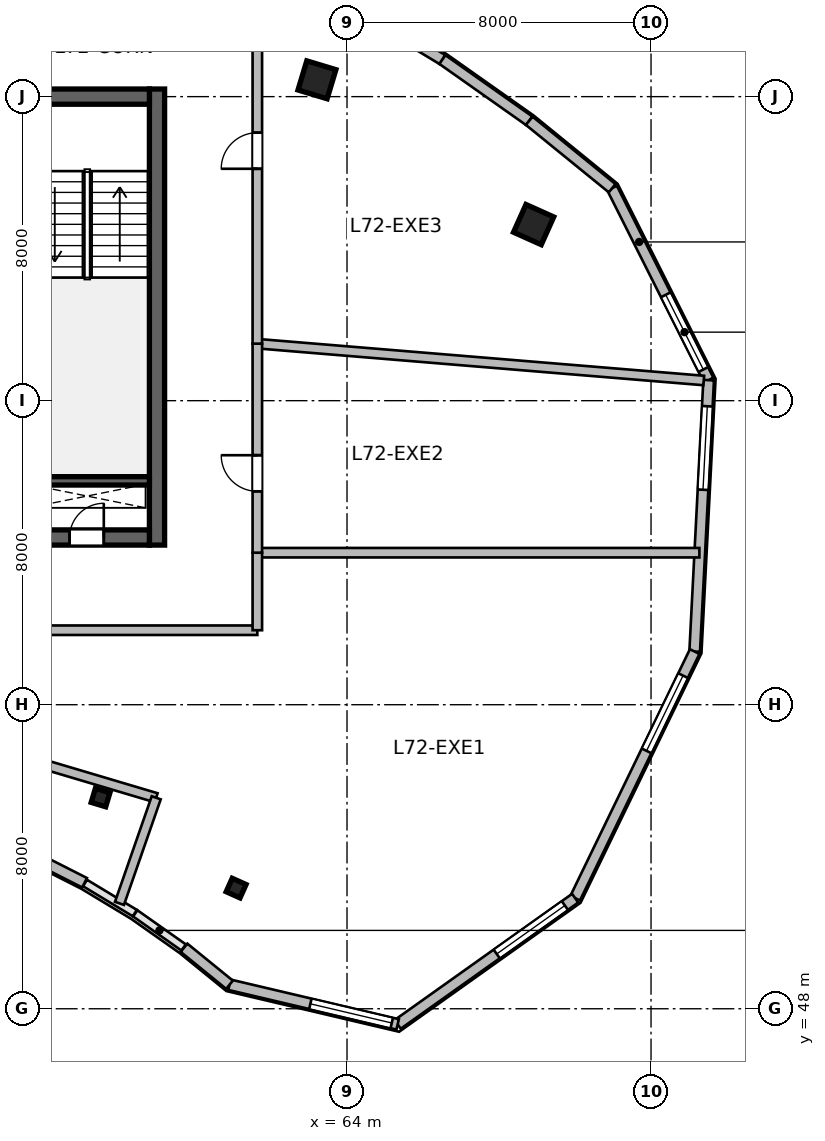
"""IFC4 building model, lengths in metres.
Left out: names, types, materials, properties, quantities, classifications, styles, units other than length and angle.
Written with IfcOpenShell. Run it as: python <this file> out.ifc"""

import sys

from ifc_helpers import new_model, si_unit, direction, frame, frame_2d, origin, origin_2d, place, context, subcontext, project, spatial, rectangle, i_section, extrude, source, transform, mapped, element, fill, save


model = new_model("IFC4")
c1 = context("Model", 3, precision=1e-05, world=origin(), true_north=direction((0.0, 1.0)))
c2 = subcontext(c1, "Body", "Model", "MODEL_VIEW")
j1 = project(units=[si_unit("LENGTHUNIT", "METRE"), si_unit("PLANEANGLEUNIT", "RADIAN")], contexts=[c1])
p1 = place(None, origin())
s1 = spatial("IfcSite", under=j1, at=p1, CompositionType="ELEMENT")
p2 = place(p1, origin())
s2 = spatial("IfcBuilding", under=s1, at=p2, CompositionType="ELEMENT")
p3 = place(p2, frame((0.0, 0.0, 295.2)))
s3 = spatial("IfcBuildingStorey", under=s2, at=p3, CompositionType="ELEMENT", Elevation=295.2)
m1 = source(origin(), c2, "Body", "SweptSolid", [
    extrude(rectangle(XDim=12.0, YDim=0.4, at=frame_2d((6.0, 0.0))), origin(), (0.0, 0.0, 1.0), 3.9),
])
p4 = place(p3, frame((59.0, 60.2, 0.0), z_axis=(0.0, 0.0, 1.0), x_axis=(0.0, 1.0, 0.0)))
e1 = element("IfcWall", 1, at=p4, inside=s3, PredefinedType="SHEAR", context=c2, shape_type="MappedRepresentation", body=[
    mapped(m1, transform((0.0, 0.0, 0.0), scale=1.0)),
])
m2 = source(origin(), c2, "Body", "SweptSolid", [
    extrude(rectangle(XDim=21.6, YDim=0.4, at=frame_2d((10.8, 0.0))), origin(), (0.0, 0.0, 1.0), 3.9),
])
p5 = place(p3, frame((37.2, 60.4, 0.0), z_axis=(0.0, 0.0, 1.0), x_axis=(1.0, 0.0, 0.0)))
e2 = element("IfcWall", 2, at=p5, inside=s3, PredefinedType="SHEAR", context=c2, shape_type="MappedRepresentation", body=[
    mapped(m2, transform((0.0, 0.0, 0.0), scale=1.0)),
])
p6 = place(p5, frame((1.1, 0.0, 0.0)))
e3 = element("IfcOpeningElement", 3, at=p6, cuts=e2, PredefinedType="OPENING", context=c2, shape_type="SweptSolid", body=[
    extrude(rectangle(XDim=1.15, YDim=2.15, at=frame_2d((0.575, 1.075))), frame((0.0, 0.21, 0.0), z_axis=(0.0, -1.0, 0.0), x_axis=(1.0, 0.0, 0.0)), (0.0, 0.0, 1.0), 0.42),
])
p7 = place(p5, frame((19.5, 0.0, 0.0)))
e4 = element("IfcOpeningElement", 4, at=p7, cuts=e2, PredefinedType="OPENING", context=c2, shape_type="SweptSolid", body=[
    extrude(rectangle(XDim=0.9, YDim=2.1, at=frame_2d((0.45, 1.05))), frame((0.0, 0.21, 0.0), z_axis=(0.0, -1.0, 0.0), x_axis=(1.0, 0.0, 0.0)), (0.0, 0.0, 1.0), 0.42),
])
p8 = place(p5, frame((12.02, 0.0, 0.0)))
e5 = element("IfcOpeningElement", 5, at=p8, cuts=e2, PredefinedType="OPENING", context=c2, shape_type="SweptSolid", body=[
    extrude(rectangle(XDim=1.6, YDim=2.15, at=frame_2d((0.8, 1.075))), frame((0.0, 0.21, 0.0), z_axis=(0.0, -1.0, 0.0), x_axis=(1.0, 0.0, 0.0)), (0.0, 0.0, 1.0), 0.42),
])
p9 = place(p3, frame((37.2, 72.0, 0.0), z_axis=(0.0, 0.0, 1.0), x_axis=(1.0, 0.0, 0.0)))
e6 = element("IfcWall", 6, at=p9, inside=s3, PredefinedType="SHEAR", context=c2, shape_type="MappedRepresentation", body=[
    mapped(m2, transform((0.0, 0.0, 0.0), scale=1.0)),
])
p10 = place(p9, frame((1.2, 0.0, 0.0)))
e7 = element("IfcOpeningElement", 7, at=p10, cuts=e6, PredefinedType="OPENING", context=c2, shape_type="SweptSolid", body=[
    extrude(rectangle(XDim=0.9, YDim=2.1, at=frame_2d((0.45, 1.05))), frame((0.0, 0.21, 0.0), z_axis=(0.0, -1.0, 0.0), x_axis=(1.0, 0.0, 0.0)), (0.0, 0.0, 1.0), 0.42),
])
p11 = place(p9, frame((14.7, 0.0, 0.0)))
e8 = element("IfcOpeningElement", 8, at=p11, cuts=e6, PredefinedType="OPENING", context=c2, shape_type="SweptSolid", body=[
    extrude(rectangle(XDim=1.2, YDim=2.15, at=frame_2d((0.6, 1.075))), frame((0.0, 0.21, 0.0), z_axis=(0.0, -1.0, 0.0), x_axis=(1.0, 0.0, 0.0)), (0.0, 0.0, 1.0), 0.42),
])
p12 = place(p9, frame((4.15, 0.0, 0.0)))
e9 = element("IfcOpeningElement", 9, at=p12, cuts=e6, PredefinedType="OPENING", context=c2, shape_type="SweptSolid", body=[
    extrude(rectangle(XDim=1.3, YDim=2.15, at=frame_2d((0.65, 1.075))), frame((0.0, 0.21, 0.0), z_axis=(0.0, -1.0, 0.0), x_axis=(1.0, 0.0, 0.0)), (0.0, 0.0, 1.0), 0.42),
])
p13 = place(p9, frame((7.25, 0.0, 0.0)))
e10 = element("IfcOpeningElement", 10, at=p13, cuts=e6, PredefinedType="OPENING", context=c2, shape_type="SweptSolid", body=[
    extrude(rectangle(XDim=0.9, YDim=2.1, at=frame_2d((0.45, 1.05))), frame((0.0, 0.21, 0.0), z_axis=(0.0, -1.0, 0.0), x_axis=(1.0, 0.0, 0.0)), (0.0, 0.0, 1.0), 0.42),
])
p14 = place(p9, frame((10.95, 0.0, 0.0)))
e11 = element("IfcOpeningElement", 11, at=p14, cuts=e6, PredefinedType="OPENING", context=c2, shape_type="SweptSolid", body=[
    extrude(rectangle(XDim=0.9, YDim=2.1, at=frame_2d((0.45, 1.05))), frame((0.0, 0.21, 0.0), z_axis=(0.0, -1.0, 0.0), x_axis=(1.0, 0.0, 0.0)), (0.0, 0.0, 1.0), 0.42),
])
m3 = source(origin(), c2, "Body", "SweptSolid", [
    extrude(rectangle(XDim=3.27, YDim=0.22, at=frame_2d((1.635, 0.0))), origin(), (0.0, 0.0, 1.0), 3.9),
])
p15 = place(p3, frame((55.53, 61.89, 0.0), z_axis=(0.0, 0.0, 1.0), x_axis=(1.0, 0.0, 0.0)))
e12 = element("IfcWall", 12, at=p15, inside=s3, PredefinedType="SHEAR", context=c2, shape_type="MappedRepresentation", body=[
    mapped(m3, transform((0.0, 0.0, 0.0), scale=1.0)),
])
m4 = source(origin(), c2, "Body", "SweptSolid", [
    extrude(i_section(OverallWidth=0.399, OverallDepth=0.387, WebThickness=0.021, FlangeThickness=0.033, at=origin_2d()), origin(), (0.0, 0.0, 1.0), 3.9),
])
p16 = place(p3, frame((57.515, 53.558, 0.0), z_axis=(0.0, 0.0, 1.0), x_axis=(0.288697611798, 0.957420330337, 0.0)))
e13 = element("IfcColumn", 13, at=p16, inside=s3, PredefinedType="COLUMN", context=c2, shape_type="MappedRepresentation", body=[
    mapped(m4, transform((0.0, 0.0, 0.0), scale=1.0)),
])
m5 = source(origin(), c2, "Body", "SweptSolid", [
    extrude(rectangle(XDim=0.8, YDim=0.8, at=origin_2d()), origin(), (0.0, 0.0, 1.0), 3.9),
])
p17 = place(p3, frame((63.209, 72.442, 0.0), z_axis=(0.0, 0.0, 1.0), x_axis=(0.288697611798, 0.957420330337, 0.0)))
e14 = element("IfcColumn", 14, at=p17, inside=s3, PredefinedType="COLUMN", context=c2, shape_type="MappedRepresentation", body=[
    mapped(m5, transform((0.0, 0.0, 0.0), scale=1.0)),
])
p18 = place(p3, frame((61.082, 51.175, 0.0), z_axis=(0.0, 0.0, 1.0), x_axis=(0.409126902895, 0.912477494148, 0.0)))
e15 = element("IfcColumn", 15, at=p18, inside=s3, PredefinedType="COLUMN", context=c2, shape_type="MappedRepresentation", body=[
    mapped(m4, transform((0.0, 0.0, 0.0), scale=1.0)),
])
p19 = place(p3, frame((68.91, 68.633, 0.0), z_axis=(0.0, 0.0, 1.0), x_axis=(0.409126902895, 0.912477494148, 0.0)))
e16 = element("IfcColumn", 16, at=p19, inside=s3, PredefinedType="COLUMN", context=c2, shape_type="MappedRepresentation", body=[
    mapped(m5, transform((0.0, 0.0, 0.0), scale=1.0)),
])
m6 = source(origin(), c2, "Body", "SweptSolid", [
    extrude(rectangle(XDim=5.653, YDim=0.28, at=frame_2d((2.827, 0.0))), origin(), (0.0, 0.0, 1.0), 3.64),
])
p20 = place(p3, frame((70.976, 69.591, 0.0), z_axis=(0.0, 0.0, 1.0), x_axis=(0.449302555419, -0.893379658205, 0.0)))
e17 = element("IfcWall", 17, at=p20, inside=s3, PredefinedType="SOLIDWALL", context=c2, shape_type="MappedRepresentation", body=[
    mapped(m6, transform((0.0, 0.0, 0.0), scale=1.0)),
])
p21 = place(p20, frame((3.14, 0.0, 0.95)))
e18 = element("IfcOpeningElement", 18, at=p21, cuts=e17, PredefinedType="OPENING", context=c2, shape_type="SweptSolid", body=[
    extrude(rectangle(XDim=2.2, YDim=2.1, at=frame_2d((1.1, 1.05))), frame((0.0, 0.15, 0.0), z_axis=(0.0, -1.0, 0.0), x_axis=(1.0, 0.0, 0.0)), (0.0, 0.0, 1.0), 0.3),
])
m7 = source(origin(), c2, "Body", "SweptSolid", [
    extrude(rectangle(XDim=7.151, YDim=0.28, at=frame_2d((3.576, 0.0))), origin(), (0.0, 0.0, 1.0), 3.64),
])
p22 = place(p3, frame((73.516, 64.54, 0.0), z_axis=(0.0, 0.0, 1.0), x_axis=(-0.051449614265, -0.998675591567, 0.0)))
e19 = element("IfcWall", 19, at=p22, inside=s3, PredefinedType="SOLIDWALL", context=c2, shape_type="MappedRepresentation", body=[
    mapped(m7, transform((0.0, 0.0, 0.0), scale=1.0)),
])
p23 = place(p22, frame((0.688, 0.0, 0.95)))
e20 = element("IfcOpeningElement", 20, at=p23, cuts=e19, PredefinedType="OPENING", context=c2, shape_type="SweptSolid", body=[
    extrude(rectangle(XDim=2.2, YDim=2.1, at=frame_2d((1.1, 1.05))), frame((0.0, 0.15, 0.0), z_axis=(0.0, -1.0, 0.0), x_axis=(1.0, 0.0, 0.0)), (0.0, 0.0, 1.0), 0.3),
])
m8 = source(origin(), c2, "Body", "SweptSolid", [
    extrude(rectangle(XDim=7.211, YDim=0.28, at=frame_2d((3.606, 0.0))), origin(), (0.0, 0.0, 1.0), 3.64),
])
p24 = place(p3, frame((73.148, 57.399, 0.0), z_axis=(0.0, 0.0, 1.0), x_axis=(-0.436088263006, -0.899903898685, 0.0)))
e21 = element("IfcWall", 21, at=p24, inside=s3, PredefinedType="SOLIDWALL", context=c2, shape_type="MappedRepresentation", body=[
    mapped(m8, transform((0.0, 0.0, 0.0), scale=1.0)),
])
p25 = place(p24, frame((0.703, 0.0, 0.95)))
e22 = element("IfcOpeningElement", 22, at=p25, cuts=e21, PredefinedType="OPENING", context=c2, shape_type="SweptSolid", body=[
    extrude(rectangle(XDim=2.2, YDim=2.1, at=frame_2d((1.1, 1.05))), frame((0.0, 0.15, 0.0), z_axis=(0.0, -1.0, 0.0), x_axis=(1.0, 0.0, 0.0)), (0.0, 0.0, 1.0), 0.3),
])
m9 = source(origin(), c2, "Body", "SweptSolid", [
    extrude(rectangle(XDim=5.731, YDim=0.28, at=frame_2d((2.865, 0.0))), origin(), (0.0, 0.0, 1.0), 3.64),
])
p26 = place(p3, frame((70.004, 50.909, 0.0), z_axis=(0.0, 0.0, 1.0), x_axis=(-0.815021045908, -0.579431354629, 0.0)))
e23 = element("IfcWall", 23, at=p26, inside=s3, PredefinedType="SOLIDWALL", context=c2, shape_type="MappedRepresentation", body=[
    mapped(m9, transform((0.0, 0.0, 0.0), scale=1.0)),
])
p27 = place(p26, frame((0.333, 0.0, 0.95)))
e24 = element("IfcOpeningElement", 24, at=p27, cuts=e23, PredefinedType="OPENING", context=c2, shape_type="SweptSolid", body=[
    extrude(rectangle(XDim=2.2, YDim=2.1, at=frame_2d((1.1, 1.05))), frame((0.0, 0.15, 0.0), z_axis=(0.0, -1.0, 0.0), x_axis=(1.0, 0.0, 0.0)), (0.0, 0.0, 1.0), 0.3),
])
m10 = source(origin(), c2, "Body", "SweptSolid", [
    extrude(rectangle(XDim=4.547, YDim=0.28, at=frame_2d((2.273, 0.0))), origin(), (0.0, 0.0, 1.0), 3.64),
])
p28 = place(p3, frame((65.333, 47.589, 0.0), z_axis=(0.0, 0.0, 1.0), x_axis=(-0.973332593516, 0.229398479505, 0.0)))
e25 = element("IfcWall", 25, at=p28, inside=s3, PredefinedType="SOLIDWALL", context=c2, shape_type="MappedRepresentation", body=[
    mapped(m10, transform((0.0, 0.0, 0.0), scale=1.0)),
])
p29 = place(p28, frame((0.16, 0.0, 0.95)))
e26 = element("IfcOpeningElement", 26, at=p29, cuts=e25, PredefinedType="OPENING", context=c2, shape_type="SweptSolid", body=[
    extrude(rectangle(XDim=2.2, YDim=2.1, at=frame_2d((1.1, 1.05))), frame((0.0, 0.15, 0.0), z_axis=(0.0, -1.0, 0.0), x_axis=(1.0, 0.0, 0.0)), (0.0, 0.0, 1.0), 0.3),
])
m11 = source(origin(), c2, "Body", "SweptSolid", [
    extrude(rectangle(XDim=1.543, YDim=0.28, at=frame_2d((0.772, 0.0))), origin(), (0.0, 0.0, 1.0), 3.64),
])
p30 = place(p3, frame((60.908, 48.632, 0.0), z_axis=(0.0, 0.0, 1.0), x_axis=(-0.77582846857, 0.63094388606, 0.0)))
e27 = element("IfcWall", 27, at=p30, inside=s3, PredefinedType="SOLIDWALL", context=c2, shape_type="MappedRepresentation", body=[
    mapped(m11, transform((0.0, 0.0, 0.0), scale=1.0)),
])
m12 = source(origin(), c2, "Body", "SweptSolid", [
    extrude(rectangle(XDim=1.509, YDim=0.28, at=frame_2d((0.754, 0.0))), origin(), (0.0, 0.0, 1.0), 3.64),
])
p31 = place(p3, frame((57.094, 51.315, 0.0), z_axis=(0.0, 0.0, 1.0), x_axis=(-0.89169189228, 0.452642871635, 0.0)))
e28 = element("IfcWall", 28, at=p31, inside=s3, PredefinedType="SOLIDWALL", context=c2, shape_type="MappedRepresentation", body=[
    mapped(m12, transform((0.0, 0.0, 0.0), scale=1.0)),
])
m13 = source(origin(), c2, "Body", "SweptSolid", [
    extrude(rectangle(XDim=2.748, YDim=0.28, at=frame_2d((1.374, 0.0))), origin(), (0.0, 0.0, 1.0), 3.64),
])
p32 = place(p3, frame((64.157, 74.396, 0.0), z_axis=(0.0, 0.0, 1.0), x_axis=(0.856149718453, -0.516727838996, 0.0)))
e29 = element("IfcWall", 29, at=p32, inside=s3, PredefinedType="SOLIDWALL", context=c2, shape_type="MappedRepresentation", body=[
    mapped(m13, transform((0.0, 0.0, 0.0), scale=1.0)),
])
m14 = source(origin(), c2, "Body", "SweptSolid", [
    extrude(rectangle(XDim=2.795, YDim=0.28, at=frame_2d((1.397, 0.0))), origin(), (0.0, 0.0, 1.0), 3.64),
])
p33 = place(p3, frame((66.51, 72.975, 0.0), z_axis=(0.0, 0.0, 1.0), x_axis=(0.817265517835, -0.576261289136, 0.0)))
e30 = element("IfcWall", 30, at=p33, inside=s3, PredefinedType="SOLIDWALL", context=c2, shape_type="MappedRepresentation", body=[
    mapped(m14, transform((0.0, 0.0, 0.0), scale=1.0)),
])
m15 = source(origin(), c2, "Body", "SweptSolid", [
    extrude(rectangle(XDim=2.812, YDim=0.28, at=frame_2d((1.406, 0.0))), origin(), (0.0, 0.0, 1.0), 3.64),
])
p34 = place(p3, frame((68.795, 71.365, 0.0), z_axis=(0.0, 0.0, 1.0), x_axis=(0.775880230716, -0.630880232361, 0.0)))
e31 = element("IfcWall", 31, at=p34, inside=s3, PredefinedType="SOLIDWALL", context=c2, shape_type="MappedRepresentation", body=[
    mapped(m15, transform((0.0, 0.0, 0.0), scale=1.0)),
])
m16 = source(origin(), c2, "Body", "SweptSolid", [
    extrude(rectangle(XDim=11.454, YDim=0.25, at=frame_2d((5.727, 0.0))), origin(), (0.0, 0.0, 1.0), 3.314),
])
p35 = place(p3, frame((48.0, 56.813, 0.0), z_axis=(0.0, 0.0, 1.0), x_axis=(0.958594874645, -0.284773359541, 0.0)))
e32 = element("IfcWall", 32, at=p35, inside=s3, PredefinedType="PARTITIONING", context=c2, shape_type="MappedRepresentation", body=[
    mapped(m16, transform((0.0, 0.0, 0.0), scale=1.0)),
])
p36 = place(p35, frame((5.627, 0.0, 0.0)))
e33 = element("IfcOpeningElement", 33, at=p36, cuts=e32, PredefinedType="OPENING", context=c2, shape_type="SweptSolid", body=[
    extrude(rectangle(XDim=1.1, YDim=2.15, at=frame_2d((0.55, 1.075))), frame((0.0, 0.135, 0.0), z_axis=(0.0, -1.0, 0.0), x_axis=(1.0, 0.0, 0.0)), (0.0, 0.0, 1.0), 0.27),
])
m17 = source(origin(), c2, "Body", "SweptSolid", [
    extrude(rectangle(XDim=2.942, YDim=0.25, at=frame_2d((1.471, 0.0))), origin(), (0.0, 0.0, 1.0), 3.64),
])
p37 = place(p3, frame((58.013, 50.773, 0.0), z_axis=(0.0, 0.0, 1.0), x_axis=(0.328623620494, 0.944460965871, 0.0)))
e34 = element("IfcWall", 34, at=p37, inside=s3, PredefinedType="PARTITIONING", context=c2, shape_type="MappedRepresentation", body=[
    mapped(m17, transform((0.0, 0.0, 0.0), scale=1.0)),
])
m18 = source(origin(), c2, "Body", "SweptSolid", [
    extrude(rectangle(XDim=12.39, YDim=0.25, at=frame_2d((6.195, 0.0))), origin(), (0.0, 0.0, 1.0), 3.64),
])
p38 = place(p3, frame((49.25, 57.96, 0.0), z_axis=(0.0, 0.0, 1.0), x_axis=(1.0, 0.0, 0.0)))
e35 = element("IfcWall", 35, at=p38, inside=s3, PredefinedType="PARTITIONING", context=c2, shape_type="MappedRepresentation", body=[
    mapped(m18, transform((0.0, 0.0, 0.0), scale=1.0)),
])
m19 = source(origin(), c2, "Body", "SweptSolid", [
    extrude(rectangle(XDim=11.633, YDim=0.25, at=frame_2d((5.816, 0.0))), origin(), (0.0, 0.0, 1.0), 3.64),
])
p39 = place(p3, frame((61.64, 60.0, 0.0), z_axis=(0.0, 0.0, 1.0), x_axis=(1.0, 0.0, 0.0)))
e36 = element("IfcWall", 36, at=p39, inside=s3, PredefinedType="PARTITIONING", context=c2, shape_type="MappedRepresentation", body=[
    mapped(m19, transform((0.0, 0.0, 0.0), scale=1.0)),
])
m20 = source(origin(), c2, "Body", "SweptSolid", [
    extrude(rectangle(XDim=2.04, YDim=0.25, at=frame_2d((1.02, 0.0))), origin(), (0.0, 0.0, 1.0), 3.64),
])
p40 = place(p3, frame((61.64, 57.96, 0.0), z_axis=(0.0, 0.0, 1.0), x_axis=(0.0, 1.0, 0.0)))
e37 = element("IfcWall", 37, at=p40, inside=s3, PredefinedType="PARTITIONING", context=c2, shape_type="MappedRepresentation", body=[
    mapped(m20, transform((0.0, 0.0, 0.0), scale=1.0)),
])
m21 = source(origin(), c2, "Body", "SweptSolid", [
    extrude(rectangle(XDim=11.787, YDim=0.25, at=frame_2d((5.893, 0.0))), origin(), (0.0, 0.0, 1.0), 3.64),
])
p41 = place(p3, frame((61.64, 65.5, 0.0), z_axis=(0.0, 0.0, 1.0), x_axis=(0.996614976318, -0.082210637868, 0.0)))
e38 = element("IfcWall", 38, at=p41, inside=s3, PredefinedType="PARTITIONING", context=c2, shape_type="MappedRepresentation", body=[
    mapped(m21, transform((0.0, 0.0, 0.0), scale=1.0)),
])
m22 = source(origin(), c2, "Body", "SweptSolid", [
    extrude(rectangle(XDim=5.5, YDim=0.25, at=frame_2d((2.75, 0.0))), origin(), (0.0, 0.0, 1.0), 3.64),
])
p42 = place(p3, frame((61.64, 60.0, 0.0), z_axis=(0.0, 0.0, 1.0), x_axis=(0.0, 1.0, 0.0)))
e39 = element("IfcWall", 39, at=p42, inside=s3, PredefinedType="PARTITIONING", context=c2, shape_type="MappedRepresentation", body=[
    mapped(m22, transform((0.0, 0.0, 0.0), scale=1.0)),
])
p43 = place(p42, frame((1.615, 0.0, 0.0)))
e40 = element("IfcOpeningElement", 40, at=p43, cuts=e39, PredefinedType="OPENING", context=c2, shape_type="SweptSolid", body=[
    extrude(rectangle(XDim=0.95, YDim=2.1, at=frame_2d((0.475, 1.05))), frame((0.0, 0.135, 0.0), z_axis=(0.0, -1.0, 0.0), x_axis=(1.0, 0.0, 0.0)), (0.0, 0.0, 1.0), 0.27),
])
m23 = source(origin(), c2, "Body", "SweptSolid", [
    extrude(rectangle(XDim=10.153, YDim=0.25, at=frame_2d((5.077, 0.0))), origin(), (0.0, 0.0, 1.0), 3.64),
])
p44 = place(p3, frame((61.64, 65.5, 0.0), z_axis=(0.0, 0.0, 1.0), x_axis=(0.0, 1.0, 0.0)))
e41 = element("IfcWall", 41, at=p44, inside=s3, PredefinedType="PARTITIONING", context=c2, shape_type="MappedRepresentation", body=[
    mapped(m23, transform((0.0, 0.0, 0.0), scale=1.0)),
])
p45 = place(p44, frame((4.602, 0.0, 0.0)))
e42 = element("IfcOpeningElement", 42, at=p45, cuts=e41, PredefinedType="OPENING", context=c2, shape_type="SweptSolid", body=[
    extrude(rectangle(XDim=0.95, YDim=2.1, at=frame_2d((0.475, 1.05))), frame((0.0, 0.135, 0.0), z_axis=(0.0, -1.0, 0.0), x_axis=(1.0, 0.0, 0.0)), (0.0, 0.0, 1.0), 0.27),
])
m24 = source(origin(), c2, "Body", "SweptSolid", [
    extrude(rectangle(XDim=2.2, YDim=2.1, at=frame_2d((1.1, 1.05))), frame((0.0, 0.03, 0.0), z_axis=(0.0, -1.0, 0.0), x_axis=(1.0, 0.0, 0.0)), (0.0, 0.0, 1.0), 0.06),
])
p46 = place(p21, origin())
e43 = element("IfcWindow", 43, at=p46, inside=s3, PartitioningType="TRIPLE_PANEL_VERTICAL", PredefinedType="WINDOW", context=c2, shape_type="MappedRepresentation", body=[
    mapped(m24, transform((0.0, 0.0, 0.0), scale=1.0)),
])
fill(e18, e43)
p47 = place(p23, origin())
e44 = element("IfcWindow", 44, at=p47, inside=s3, PartitioningType="TRIPLE_PANEL_VERTICAL", PredefinedType="WINDOW", context=c2, shape_type="MappedRepresentation", body=[
    mapped(m24, transform((0.0, 0.0, 0.0), scale=1.0)),
])
fill(e20, e44)
p48 = place(p25, origin())
e45 = element("IfcWindow", 45, at=p48, inside=s3, PartitioningType="TRIPLE_PANEL_VERTICAL", PredefinedType="WINDOW", context=c2, shape_type="MappedRepresentation", body=[
    mapped(m24, transform((0.0, 0.0, 0.0), scale=1.0)),
])
fill(e22, e45)
p49 = place(p27, origin())
e46 = element("IfcWindow", 46, at=p49, inside=s3, PartitioningType="TRIPLE_PANEL_VERTICAL", PredefinedType="WINDOW", context=c2, shape_type="MappedRepresentation", body=[
    mapped(m24, transform((0.0, 0.0, 0.0), scale=1.0)),
])
fill(e24, e46)
p50 = place(p29, origin())
e47 = element("IfcWindow", 47, at=p50, inside=s3, PartitioningType="TRIPLE_PANEL_VERTICAL", PredefinedType="WINDOW", context=c2, shape_type="MappedRepresentation", body=[
    mapped(m24, transform((0.0, 0.0, 0.0), scale=1.0)),
])
fill(e26, e47)
m25 = source(origin(), c2, "Body", "SweptSolid", [
    extrude(rectangle(XDim=0.9, YDim=2.1, at=frame_2d((0.45, 1.05))), frame((0.0, 0.025, 0.0), z_axis=(0.0, -1.0, 0.0), x_axis=(1.0, 0.0, 0.0)), (0.0, 0.0, 1.0), 0.05),
])
p51 = place(p7, origin())
e48 = element("IfcDoor", 48, at=p51, inside=s3, OperationType="SINGLE_SWING_RIGHT", PredefinedType="DOOR", context=c2, shape_type="MappedRepresentation", body=[
    mapped(m25, transform((0.0, 0.0, 0.0), scale=1.0)),
])
fill(e4, e48)
m26 = source(origin(), c2, "Body", "SweptSolid", [
    extrude(rectangle(XDim=0.95, YDim=2.1, at=frame_2d((0.475, 1.05))), frame((0.0, 0.025, 0.0), z_axis=(0.0, -1.0, 0.0), x_axis=(1.0, 0.0, 0.0)), (0.0, 0.0, 1.0), 0.05),
])
p52 = place(p43, origin())
e49 = element("IfcDoor", 49, at=p52, inside=s3, OperationType="SINGLE_SWING_RIGHT", PredefinedType="DOOR", context=c2, shape_type="MappedRepresentation", body=[
    mapped(m26, transform((0.0, 0.0, 0.0), scale=1.0)),
])
fill(e40, e49)
p53 = place(p45, origin())
e50 = element("IfcDoor", 50, at=p53, inside=s3, OperationType="SINGLE_SWING_LEFT", PredefinedType="DOOR", context=c2, shape_type="MappedRepresentation", body=[
    mapped(m26, transform((0.0, 0.0, 0.0), scale=1.0)),
])
fill(e42, e50)
save(model, sys.argv[1])
